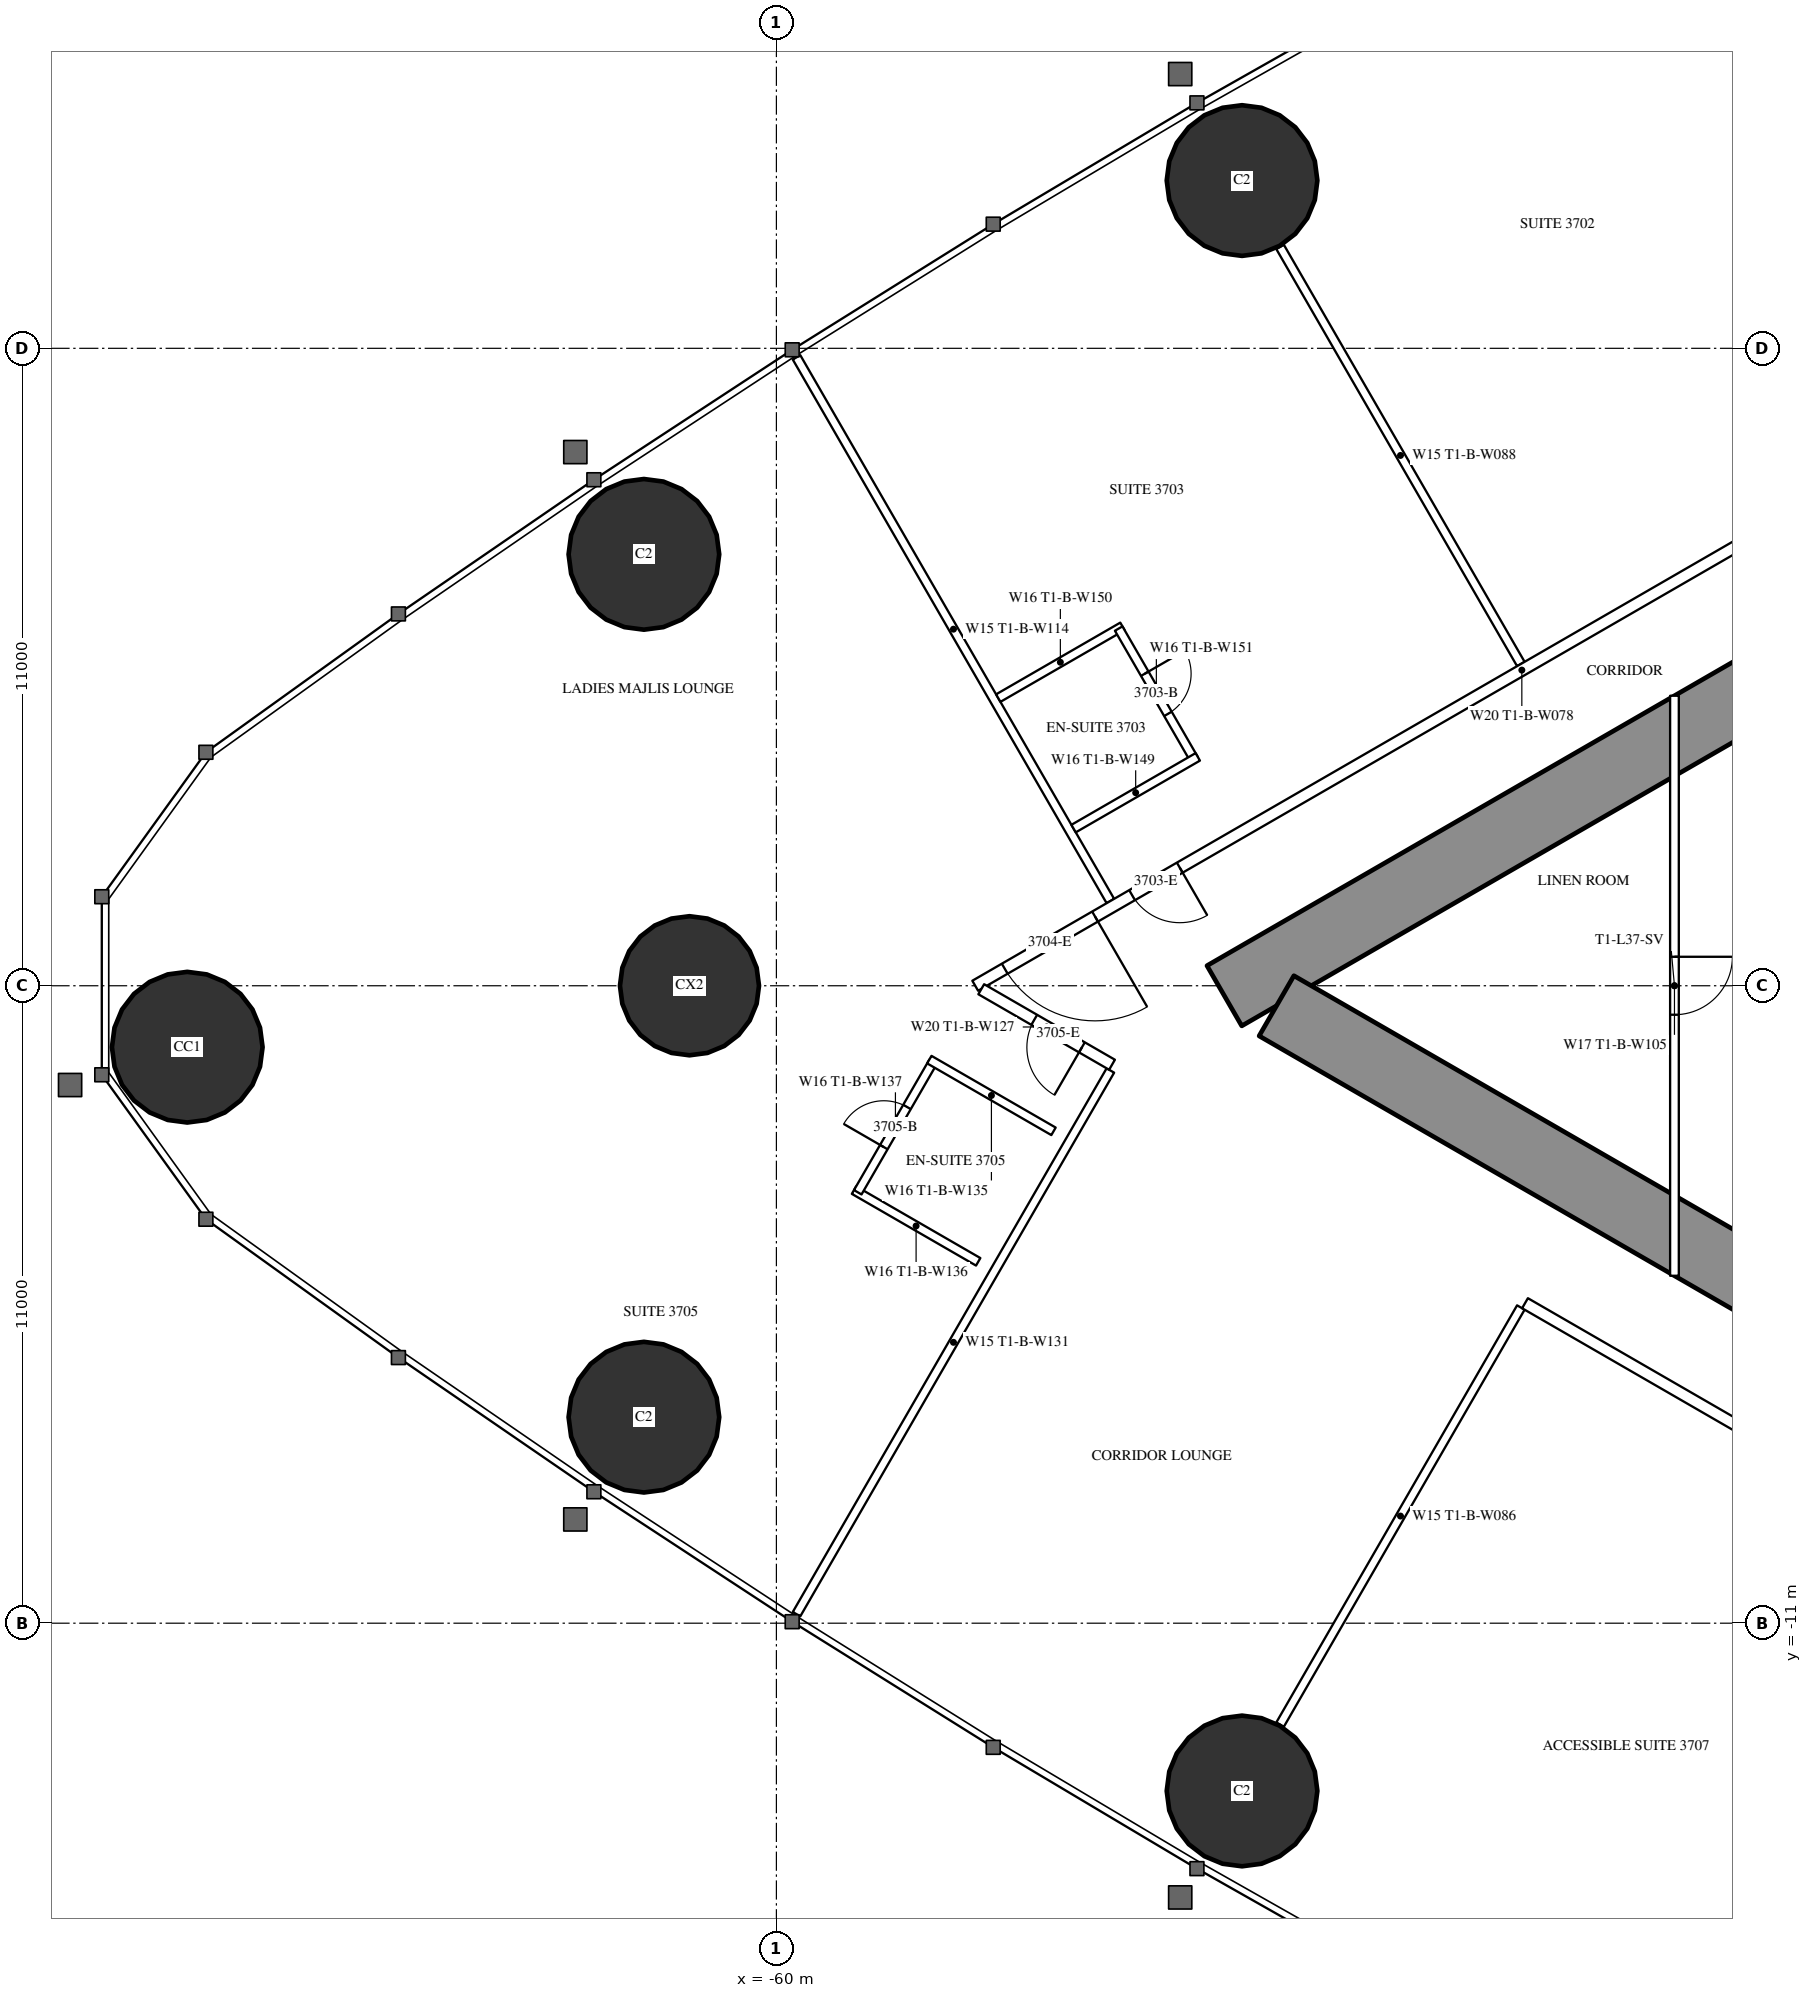
"""IFC4 building model, lengths in metres.
Left out: names, types, materials, properties, quantities, classifications, styles, units other than length and angle.
Written with IfcOpenShell. Run it as: python <this file> out.ifc"""

import sys

from ifc_helpers import new_model, si_unit, direction, frame, frame_2d, origin, origin_2d, place, context, subcontext, project, spatial, rectangle, circle, hollow_circle, extrude, element, fill, save


model = new_model("IFC4")
c1 = context("Model", 3, precision=1e-05, world=origin(), true_north=direction((0.0, 1.0)))
c2 = subcontext(c1, "Body", "Model", "MODEL_VIEW")
j1 = project(units=[si_unit("LENGTHUNIT", "METRE"), si_unit("PLANEANGLEUNIT", "RADIAN")], contexts=[c1])
p1 = place(None, origin())
s1 = spatial("IfcSite", under=j1, at=p1, CompositionType="ELEMENT")
p2 = place(p1, origin())
s2 = spatial("IfcBuilding", under=s1, at=p2, CompositionType="ELEMENT")
p3 = place(p2, frame((0.0, 0.0, 139.6)))
s3 = spatial("IfcBuildingStorey", under=s2, at=p3, CompositionType="ELEMENT", Elevation=139.6)
for number, where, z_axis, x_axis in (
    (1, (-70.168, -1.06, 0.0), (0.0, 0.0, 1.0), (1.0, 0.0, 0.0)),
    (2, (-62.287, -7.445, 0.0), (0.0, 0.0, 1.0), (1.0, 0.0, 0.0)),
    (3, (-51.963, -13.895, 0.0), (0.0, 0.0, 1.0), (1.0, 0.0, 0.0)),
    (4, (-51.963, 13.895, 0.0), (0.0, 0.0, 1.0), (1.0, 0.0, 0.0)),
    (5, (-62.287, 7.445, 0.0), (0.0, 0.0, 1.0), (1.0, 0.0, 0.0)),
):
    element("IfcColumn", number, at=place(p3, frame(where, z_axis=z_axis, x_axis=x_axis)), inside=s3, PredefinedType="COLUMN", context=c2, shape_type="SweptSolid", body=[
        extrude(hollow_circle(Radius=1.3, WallThickness=0.1, at=origin_2d()), origin(), (0.0, 0.0, 1.0), 3.5),
    ])
p4 = place(p3, frame((-61.5, 0.0, 0.0), z_axis=(0.0, 0.0, 1.0), x_axis=(1.0, 0.0, 0.0)))
e6 = element("IfcColumn", 6, at=p4, inside=s3, PredefinedType="COLUMN", context=c2, shape_type="SweptSolid", body=[
    extrude(circle(Radius=1.2, at=origin_2d()), origin(), (0.0, 0.0, 1.0), 3.5),
])
p5 = place(p3, frame((-27.2, 14.3, 0.0), z_axis=(0.0, 0.0, 1.0), x_axis=(-0.866026593062, -0.499997940104, 0.0)))
e7 = element("IfcWall", 7, at=p5, inside=s3, PredefinedType="SHEAR", context=c2, shape_type="SweptSolid", body=[
    extrude(rectangle(XDim=28.946, YDim=1.2, at=frame_2d((14.473, 0.0))), origin(), (0.0, 0.0, 1.0), 3.5),
])
p6 = place(p5, frame((4.6, 0.0, 0.0)))
e8 = element("IfcOpeningElement", 8, at=p6, cuts=e7, PredefinedType="OPENING", context=c2, shape_type="SweptSolid", body=[
    extrude(rectangle(XDim=1.0, YDim=2.2, at=frame_2d((0.5, 1.1))), frame((0.0, 0.61, 0.0), z_axis=(0.0, -1.0, 0.0), x_axis=(1.0, 0.0, 0.0)), (0.0, 0.0, 1.0), 1.22),
])
p7 = place(p5, frame((13.395, 0.0, 0.0)))
e9 = element("IfcOpeningElement", 9, at=p7, cuts=e7, PredefinedType="OPENING", context=c2, shape_type="SweptSolid", body=[
    extrude(rectangle(XDim=1.8, YDim=2.2, at=frame_2d((0.9, 1.1))), frame((0.0, 0.61, 0.0), z_axis=(0.0, -1.0, 0.0), x_axis=(1.0, 0.0, 0.0)), (0.0, 0.0, 1.0), 1.22),
])
p8 = place(p3, frame((-27.2, -14.3, 0.0), z_axis=(0.0, 0.0, 1.0), x_axis=(-0.866024021859, 0.500002393557, 0.0)))
e10 = element("IfcWall", 10, at=p8, inside=s3, PredefinedType="SHEAR", context=c2, shape_type="SweptSolid", body=[
    extrude(rectangle(XDim=27.907, YDim=1.2, at=frame_2d((13.954, 0.0))), origin(), (0.0, 0.0, 1.0), 3.5),
])
p9 = place(p8, frame((4.6, 0.0, 0.0)))
e11 = element("IfcOpeningElement", 11, at=p9, cuts=e10, PredefinedType="OPENING", context=c2, shape_type="SweptSolid", body=[
    extrude(rectangle(XDim=1.0, YDim=2.2, at=frame_2d((0.5, 1.1))), frame((0.0, 0.61, 0.0), z_axis=(0.0, -1.0, 0.0), x_axis=(1.0, 0.0, 0.0)), (0.0, 0.0, 1.0), 1.22),
])
p10 = place(p8, frame((13.395, 0.0, 0.0)))
e12 = element("IfcOpeningElement", 12, at=p10, cuts=e10, PredefinedType="OPENING", context=c2, shape_type="SweptSolid", body=[
    extrude(rectangle(XDim=1.8, YDim=2.2, at=frame_2d((0.9, 1.1))), frame((0.0, 0.61, 0.0), z_axis=(0.0, -1.0, 0.0), x_axis=(1.0, 0.0, 0.0)), (0.0, 0.0, 1.0), 1.22),
])
p11 = place(p3, frame((-47.151, 5.552, 0.0), z_axis=(0.0, 0.0, 1.0), x_axis=(-0.500003012045, 0.866023664773, 0.0)))
e13 = element("IfcWall", 13, at=p11, inside=s3, PredefinedType="PARTITIONING", context=c2, shape_type="SweptSolid", body=[
    extrude(rectangle(XDim=8.311, YDim=0.15, at=frame_2d((4.156, 0.0))), origin(), (0.0, 0.0, 1.0), 2.2),
])
p12 = place(p3, frame((-54.236, 1.462, 0.0), z_axis=(0.0, 0.0, 1.0), x_axis=(-0.499990351854, 0.866030974073, 0.0)))
e14 = element("IfcWall", 14, at=p12, inside=s3, PredefinedType="PARTITIONING", context=c2, shape_type="SweptSolid", body=[
    extrude(rectangle(XDim=10.834, YDim=0.15, at=frame_2d((5.417, 0.0))), origin(), (0.0, 0.0, 1.0), 3.25),
])
p13 = place(p3, frame((-47.151, -5.552, 0.0), z_axis=(0.0, 0.0, 1.0), x_axis=(-0.500003012045, -0.866023664773, 0.0)))
e15 = element("IfcWall", 15, at=p13, inside=s3, PredefinedType="PARTITIONING", context=c2, shape_type="SweptSolid", body=[
    extrude(rectangle(XDim=8.311, YDim=0.15, at=frame_2d((4.156, 0.0))), origin(), (0.0, 0.0, 1.0), 2.2),
])
p14 = place(p3, frame((-54.236, -1.462, 0.0), z_axis=(0.0, 0.0, 1.0), x_axis=(-0.499990351854, -0.866030974073, 0.0)))
e16 = element("IfcWall", 16, at=p14, inside=s3, PredefinedType="PARTITIONING", context=c2, shape_type="SweptSolid", body=[
    extrude(rectangle(XDim=10.834, YDim=0.15, at=frame_2d((5.417, 0.0))), origin(), (0.0, 0.0, 1.0), 3.25),
])
p15 = place(p3, frame((-37.7, 10.894, 0.0), z_axis=(0.0, 0.0, 1.0), x_axis=(-0.866027905338, -0.499995667157, 0.0)))
e17 = element("IfcWall", 17, at=p15, inside=s3, PredefinedType="PARTITIONING", context=c2, shape_type="SweptSolid", body=[
    extrude(rectangle(XDim=21.787, YDim=0.2, at=frame_2d((10.894, 0.0))), origin(), (0.0, 0.0, 1.0), 3.25),
])
p16 = place(p15, frame((17.711, 0.0, 0.0)))
e18 = element("IfcOpeningElement", 18, at=p16, cuts=e17, PredefinedType="OPENING", context=c2, shape_type="SweptSolid", body=[
    extrude(rectangle(XDim=0.95, YDim=2.2, at=frame_2d((0.475, 1.1))), frame((0.0, 0.11, 0.0), z_axis=(0.0, -1.0, 0.0), x_axis=(1.0, 0.0, 0.0)), (0.0, 0.0, 1.0), 0.22),
])
p17 = place(p15, frame((19.399, 0.0, 0.0)))
e19 = element("IfcOpeningElement", 19, at=p17, cuts=e17, PredefinedType="OPENING", context=c2, shape_type="SweptSolid", body=[
    extrude(rectangle(XDim=1.8, YDim=2.2, at=frame_2d((0.9, 1.1))), frame((0.0, 0.11, 0.0), z_axis=(0.0, -1.0, 0.0), x_axis=(1.0, 0.0, 0.0)), (0.0, 0.0, 1.0), 0.22),
])
p18 = place(p15, frame((0.6, 0.0, 0.0)))
e20 = element("IfcOpeningElement", 20, at=p18, cuts=e17, PredefinedType="OPENING", context=c2, shape_type="SweptSolid", body=[
    extrude(rectangle(XDim=0.95, YDim=2.2, at=frame_2d((0.475, 1.1))), frame((0.0, 0.11, 0.0), z_axis=(0.0, -1.0, 0.0), x_axis=(1.0, 0.0, 0.0)), (0.0, 0.0, 1.0), 0.22),
])
p19 = place(p3, frame((-36.92, -11.344, 0.0), z_axis=(0.0, 0.0, 1.0), x_axis=(-0.866027897759, 0.499995680284, 0.0)))
e21 = element("IfcWall", 21, at=p19, inside=s3, PredefinedType="PARTITIONING", context=c2, shape_type="SweptSolid", body=[
    extrude(rectangle(XDim=11.731, YDim=0.2, at=frame_2d((5.865, 0.0))), origin(), (0.0, 0.0, 1.0), 3.25),
])
p20 = place(p19, frame((3.35, 0.0, 0.0)))
e22 = element("IfcOpeningElement", 22, at=p20, cuts=e21, PredefinedType="OPENING", context=c2, shape_type="SweptSolid", body=[
    extrude(rectangle(XDim=1.0, YDim=2.2, at=frame_2d((0.5, 1.1))), frame((0.0, 0.11, 0.0), z_axis=(0.0, -1.0, 0.0), x_axis=(1.0, 0.0, 0.0)), (0.0, 0.0, 1.0), 0.22),
])
p21 = place(p3, frame((-54.207, -1.363, 0.0), z_axis=(0.0, 0.0, 1.0), x_axis=(-0.866049872286, 0.499957616916, 0.0)))
e23 = element("IfcWall", 23, at=p21, inside=s3, PredefinedType="PARTITIONING", context=c2, shape_type="SweptSolid", body=[
    extrude(rectangle(XDim=2.606, YDim=0.2, at=frame_2d((1.303, 0.0))), origin(), (0.0, 0.0, 1.0), 3.25),
])
p22 = place(p21, frame((0.6, 0.0, 0.0)))
e24 = element("IfcOpeningElement", 24, at=p22, cuts=e23, PredefinedType="OPENING", context=c2, shape_type="SweptSolid", body=[
    extrude(rectangle(XDim=0.95, YDim=2.2, at=frame_2d((0.475, 1.1))), frame((0.0, 0.11, 0.0), z_axis=(0.0, -1.0, 0.0), x_axis=(1.0, 0.0, 0.0)), (0.0, 0.0, 1.0), 0.22),
])
p23 = place(p3, frame((-54.027, 6.201, 0.0), z_axis=(0.0, 0.0, 1.0), x_axis=(-0.866006523861, -0.500032699561, 0.0)))
e25 = element("IfcWall", 25, at=p23, inside=s3, PredefinedType="PARTITIONING", context=c2, shape_type="SweptSolid", body=[
    extrude(rectangle(XDim=2.475, YDim=0.15, at=frame_2d((1.237, 0.0))), origin(), (0.0, 0.0, 1.0), 3.25),
])
p24 = place(p3, frame((-52.792, 3.912, 0.0), z_axis=(0.0, 0.0, 1.0), x_axis=(-0.500006934395, 0.866021400173, 0.0)))
e26 = element("IfcWall", 26, at=p24, inside=s3, PredefinedType="PARTITIONING", context=c2, shape_type="SweptSolid", body=[
    extrude(rectangle(XDim=2.6, YDim=0.15, at=frame_2d((1.3, 0.0))), origin(), (0.0, 0.0, 1.0), 3.25),
])
p25 = place(p24, frame((0.9, 0.0, 0.0)))
e27 = element("IfcOpeningElement", 27, at=p25, cuts=e26, PredefinedType="OPENING", context=c2, shape_type="SweptSolid", body=[
    extrude(rectangle(XDim=0.8, YDim=2.2, at=frame_2d((0.4, 1.1))), frame((0.0, 0.085, 0.0), z_axis=(0.0, -1.0, 0.0), x_axis=(1.0, 0.0, 0.0)), (0.0, 0.0, 1.0), 0.17),
])
p26 = place(p3, frame((-52.727, 3.95, 0.0), z_axis=(0.0, 0.0, 1.0), x_axis=(-0.866006523861, -0.500032699561, 0.0)))
e28 = element("IfcWall", 28, at=p26, inside=s3, PredefinedType="PARTITIONING", context=c2, shape_type="SweptSolid", body=[
    extrude(rectangle(XDim=2.475, YDim=0.15, at=frame_2d((1.237, 0.0))), origin(), (0.0, 0.0, 1.0), 3.25),
])
p27 = place(p3, frame((-56.517, -4.764, 0.0), z_axis=(0.0, 0.0, 1.0), x_axis=(-0.866031185235, 0.4999899861, 0.0)))
e29 = element("IfcWall", 29, at=p27, inside=s3, PredefinedType="PARTITIONING", context=c2, shape_type="SweptSolid", body=[
    extrude(rectangle(XDim=2.475, YDim=0.15, at=frame_2d((1.238, 0.0))), origin(), (0.0, 0.0, 1.0), 3.25),
])
p28 = place(p3, frame((-57.296, -1.312, 0.0), z_axis=(0.0, 0.0, 1.0), x_axis=(-0.49997716683, -0.86603858612, 0.0)))
e30 = element("IfcWall", 30, at=p28, inside=s3, PredefinedType="PARTITIONING", context=c2, shape_type="SweptSolid", body=[
    extrude(rectangle(XDim=2.6, YDim=0.15, at=frame_2d((1.3, 0.0))), origin(), (0.0, 0.0, 1.0), 3.25),
])
p29 = place(p28, frame((0.9, 0.0, 0.0)))
e31 = element("IfcOpeningElement", 31, at=p29, cuts=e30, PredefinedType="OPENING", context=c2, shape_type="SweptSolid", body=[
    extrude(rectangle(XDim=0.8, YDim=2.2, at=frame_2d((0.4, 1.1))), frame((0.0, 0.085, 0.0), z_axis=(0.0, -1.0, 0.0), x_axis=(1.0, 0.0, 0.0)), (0.0, 0.0, 1.0), 0.17),
])
p30 = place(p3, frame((-55.217, -2.512, 0.0), z_axis=(0.0, 0.0, 1.0), x_axis=(-0.866031185235, 0.4999899861, 0.0)))
e32 = element("IfcWall", 32, at=p30, inside=s3, PredefinedType="PARTITIONING", context=c2, shape_type="SweptSolid", body=[
    extrude(rectangle(XDim=2.475, YDim=0.15, at=frame_2d((1.238, 0.0))), origin(), (0.0, 0.0, 1.0), 3.25),
])
p31 = place(p3, frame((-44.5, 5.005, 0.0), z_axis=(0.0, 0.0, 1.0), x_axis=(0.0, -1.0, 0.0)))
e33 = element("IfcWall", 33, at=p31, inside=s3, PredefinedType="PARTITIONING", context=c2, shape_type="SweptSolid", body=[
    extrude(rectangle(XDim=10.009, YDim=0.15, at=frame_2d((5.005, 0.0))), origin(), (0.0, 0.0, 1.0), 2.45),
])
p32 = place(p31, frame((4.505, 0.0, 0.0)))
e34 = element("IfcOpeningElement", 34, at=p32, cuts=e33, PredefinedType="OPENING", context=c2, shape_type="SweptSolid", body=[
    extrude(rectangle(XDim=1.0, YDim=2.2, at=frame_2d((0.5, 1.1))), frame((0.0, 0.085, 0.0), z_axis=(0.0, -1.0, 0.0), x_axis=(1.0, 0.0, 0.0)), (0.0, 0.0, 1.0), 0.17),
])
p33 = place(p25, origin())
e35 = element("IfcDoor", 35, at=p33, inside=s3, OperationType="SINGLE_SWING_RIGHT", PredefinedType="DOOR", context=c2, shape_type="SweptSolid", body=[
    extrude(rectangle(XDim=0.8, YDim=2.2, at=frame_2d((0.4, 1.1))), frame((0.0, 0.025, 0.0), z_axis=(0.0, -1.0, 0.0), x_axis=(1.0, 0.0, 0.0)), (0.0, 0.0, 1.0), 0.05),
])
fill(e27, e35)
p34 = place(p16, origin())
e36 = element("IfcDoor", 36, at=p34, inside=s3, OperationType="SINGLE_SWING_LEFT", PredefinedType="DOOR", context=c2, shape_type="SweptSolid", body=[
    extrude(rectangle(XDim=0.95, YDim=2.2, at=frame_2d((0.475, 1.1))), frame((0.0, 0.025, 0.0), z_axis=(0.0, -1.0, 0.0), x_axis=(1.0, 0.0, 0.0)), (0.0, 0.0, 1.0), 0.05),
])
fill(e18, e36)
p35 = place(p17, origin())
e37 = element("IfcDoor", 37, at=p35, inside=s3, OperationType="DOUBLE_DOOR_SINGLE_SWING", PredefinedType="DOOR", context=c2, shape_type="SweptSolid", body=[
    extrude(rectangle(XDim=1.8, YDim=2.2, at=frame_2d((0.9, 1.1))), frame((0.0, 0.025, 0.0), z_axis=(0.0, -1.0, 0.0), x_axis=(1.0, 0.0, 0.0)), (0.0, 0.0, 1.0), 0.05),
])
fill(e19, e37)
p36 = place(p29, origin())
e38 = element("IfcDoor", 38, at=p36, inside=s3, OperationType="SINGLE_SWING_RIGHT", PredefinedType="DOOR", context=c2, shape_type="SweptSolid", body=[
    extrude(rectangle(XDim=0.8, YDim=2.2, at=frame_2d((0.4, 1.1))), frame((0.0, 0.025, 0.0), z_axis=(0.0, -1.0, 0.0), x_axis=(1.0, 0.0, 0.0)), (0.0, 0.0, 1.0), 0.05),
])
fill(e31, e38)
p37 = place(p22, origin())
e39 = element("IfcDoor", 39, at=p37, inside=s3, OperationType="SINGLE_SWING_LEFT", PredefinedType="DOOR", context=c2, shape_type="SweptSolid", body=[
    extrude(rectangle(XDim=0.95, YDim=2.2, at=frame_2d((0.475, 1.1))), frame((0.0, 0.025, 0.0), z_axis=(0.0, -1.0, 0.0), x_axis=(1.0, 0.0, 0.0)), (0.0, 0.0, 1.0), 0.05),
])
fill(e24, e39)
p38 = place(p32, origin())
e40 = element("IfcDoor", 40, at=p38, inside=s3, OperationType="SINGLE_SWING_LEFT", PredefinedType="DOOR", context=c2, shape_type="SweptSolid", body=[
    extrude(rectangle(XDim=1.0, YDim=2.2, at=frame_2d((0.5, 1.1))), frame((0.0, 0.025, 0.0), z_axis=(0.0, -1.0, 0.0), x_axis=(1.0, 0.0, 0.0)), (0.0, 0.0, 1.0), 0.05),
])
fill(e34, e40)
save(model, sys.argv[1])
